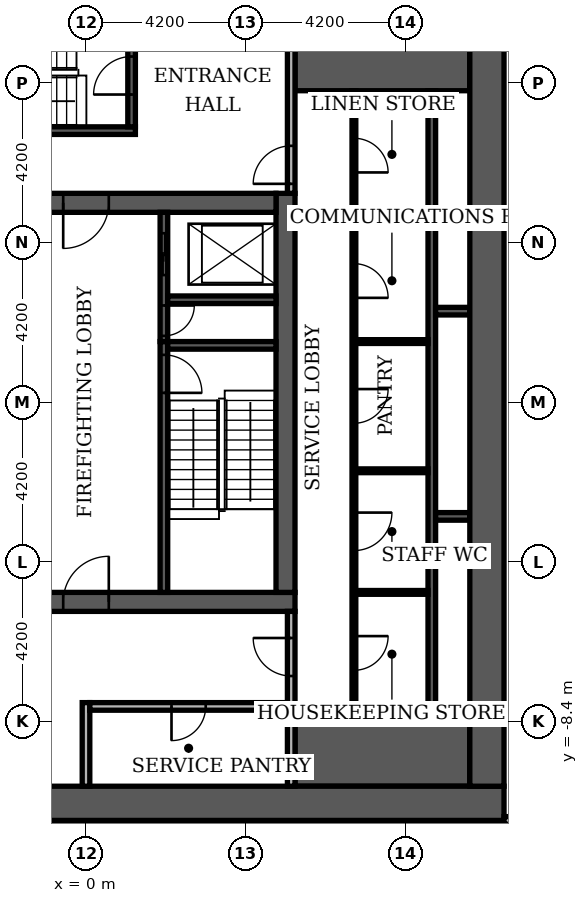
"""IFC4 building model, lengths in metres.
Left out: names, types, materials, properties, quantities, classifications, styles, units other than length and angle.
Written with IfcOpenShell. Run it as: python <this file> out.ifc"""

import sys

from ifc_helpers import new_model, si_unit, direction, frame, frame_2d, origin, place, context, subcontext, project, spatial, rectangle, extrude, element, fill, save


model = new_model("IFC4")
c1 = context("Model", 3, precision=1e-05, world=origin(), true_north=direction((0.0, 1.0)))
c2 = subcontext(c1, "Body", "Model", "MODEL_VIEW")
j1 = project(units=[si_unit("LENGTHUNIT", "METRE"), si_unit("PLANEANGLEUNIT", "RADIAN")], contexts=[c1])
p1 = place(None, origin())
s1 = spatial("IfcSite", under=j1, at=p1, CompositionType="ELEMENT")
p2 = place(p1, origin())
s2 = spatial("IfcBuilding", under=s1, at=p2, CompositionType="ELEMENT")
p3 = place(p2, frame((0.0, 0.0, -8.4)))
s3 = spatial("IfcBuildingStorey", under=s2, at=p3, CompositionType="ELEMENT", Elevation=-8.4)
p4 = place(p3, frame((-5.5, -5.25, 0.0), z_axis=(0.0, 0.0, 1.0), x_axis=(1.0, 0.0, 0.0)))
e1 = element("IfcWall", 1, at=p4, inside=s3, PredefinedType="SHEAR", context=c2, shape_type="SweptSolid", body=[
    extrude(rectangle(XDim=11.0, YDim=0.5, at=frame_2d((5.5, 0.0))), origin(), (0.0, 0.0, 1.0), 3.85),
])
p5 = place(p4, frame((4.9, 0.0, 0.0)))
e2 = element("IfcOpeningElement", 2, at=p5, cuts=e1, PredefinedType="OPENING", context=c2, shape_type="SweptSolid", body=[
    extrude(rectangle(XDim=1.2, YDim=2.1, at=frame_2d((0.6, 1.05))), frame((0.0, 0.26, 0.0), z_axis=(0.0, -1.0, 0.0), x_axis=(1.0, 0.0, 0.0)), (0.0, 0.0, 1.0), 0.52),
])
p6 = place(p3, frame((5.25, -5.0, 0.0), z_axis=(0.0, 0.0, 1.0), x_axis=(0.0, 1.0, 0.0)))
e3 = element("IfcWall", 3, at=p6, inside=s3, PredefinedType="SHEAR", context=c2, shape_type="SweptSolid", body=[
    extrude(rectangle(XDim=10.5, YDim=0.5, at=frame_2d((5.25, 0.0))), origin(), (0.0, 0.0, 1.0), 3.85),
])
p7 = place(p3, frame((-5.0, 5.25, 0.0), z_axis=(0.0, 0.0, 1.0), x_axis=(1.0, 0.0, 0.0)))
e4 = element("IfcWall", 4, at=p7, inside=s3, PredefinedType="SHEAR", context=c2, shape_type="SweptSolid", body=[
    extrude(rectangle(XDim=10.0, YDim=0.5, at=frame_2d((5.0, 0.0))), origin(), (0.0, 0.0, 1.0), 3.85),
])
p8 = place(p7, frame((4.4, 0.0, 0.0)))
e5 = element("IfcOpeningElement", 5, at=p8, cuts=e4, PredefinedType="OPENING", context=c2, shape_type="SweptSolid", body=[
    extrude(rectangle(XDim=1.2, YDim=2.1, at=frame_2d((0.6, 1.05))), frame((0.0, 0.26, 0.0), z_axis=(0.0, -1.0, 0.0), x_axis=(1.0, 0.0, 0.0)), (0.0, 0.0, 1.0), 0.52),
])
for number, where, z_axis, x_axis in (
    (6, (5.5, -9.15, 0.0), (0.0, 0.0, 1.0), (1.0, 0.0, 0.0)),
    (7, (5.5, 9.15, 0.0), (0.0, 0.0, 1.0), (1.0, 0.0, 0.0)),
):
    element("IfcWall", number, at=place(p3, frame(where, z_axis=z_axis, x_axis=x_axis)), inside=s3, PredefinedType="SHEAR", context=c2, shape_type="SweptSolid", body=[
        extrude(rectangle(XDim=4.6, YDim=1.9, at=frame_2d((2.3, 0.0))), origin(), (0.0, 0.0, 1.0), 3.85),
    ])
p9 = place(p3, frame((2.05, -5.0, 0.0), z_axis=(0.0, 0.0, 1.0), x_axis=(0.0, 1.0, 0.0)))
e8 = element("IfcWall", 8, at=p9, inside=s3, PredefinedType="SHEAR", context=c2, shape_type="SweptSolid", body=[
    extrude(rectangle(XDim=6.6, YDim=0.2, at=frame_2d((3.3, 0.0))), origin(), (0.0, 0.0, 1.0), 3.85),
])
p10 = place(p9, frame((5.25, 0.0, 0.0)))
e9 = element("IfcOpeningElement", 9, at=p10, cuts=e8, PredefinedType="OPENING", context=c2, shape_type="SweptSolid", body=[
    extrude(rectangle(XDim=1.0, YDim=2.1, at=frame_2d((0.5, 1.05))), frame((0.0, 0.11, 0.0), z_axis=(0.0, -1.0, 0.0), x_axis=(1.0, 0.0, 0.0)), (0.0, 0.0, 1.0), 0.22),
])
p11 = place(p3, frame((2.15, 1.5, 0.0), z_axis=(0.0, 0.0, 1.0), x_axis=(1.0, 0.0, 0.0)))
e10 = element("IfcWall", 10, at=p11, inside=s3, PredefinedType="SHEAR", context=c2, shape_type="SweptSolid", body=[
    extrude(rectangle(XDim=2.85, YDim=0.2, at=frame_2d((1.425, 0.0))), origin(), (0.0, 0.0, 1.0), 3.85),
])
p12 = place(p3, frame((-5.5, 7.15, 0.0), z_axis=(0.0, 0.0, 1.0), x_axis=(1.0, 0.0, 0.0)))
e11 = element("IfcWall", 11, at=p12, inside=s3, PredefinedType="SHEAR", context=c2, shape_type="SweptSolid", body=[
    extrude(rectangle(XDim=6.8, YDim=0.2, at=frame_2d((3.4, 0.0))), origin(), (0.0, 0.0, 1.0), 3.85),
])
p13 = place(p3, frame((1.2, 7.25, 0.0), z_axis=(0.0, 0.0, 1.0), x_axis=(0.0, 1.0, 0.0)))
e12 = element("IfcWall", 12, at=p13, inside=s3, PredefinedType="SHEAR", context=c2, shape_type="SweptSolid", body=[
    extrude(rectangle(XDim=2.85, YDim=0.2, at=frame_2d((1.425, 0.0))), origin(), (0.0, 0.0, 1.0), 3.85),
])
p14 = place(p13, frame((0.85, 0.0, 0.0)))
e13 = element("IfcOpeningElement", 13, at=p14, cuts=e12, PredefinedType="OPENING", context=c2, shape_type="SweptSolid", body=[
    extrude(rectangle(XDim=1.0, YDim=2.1, at=frame_2d((0.5, 1.05))), frame((0.0, 0.11, 0.0), z_axis=(0.0, -1.0, 0.0), x_axis=(1.0, 0.0, 0.0)), (0.0, 0.0, 1.0), 0.22),
])
p15 = place(p3, frame((9.1, -8.2, 0.0), z_axis=(0.0, 0.0, 1.0), x_axis=(0.0, 1.0, 0.0)))
e14 = element("IfcWall", 14, at=p15, inside=s3, PredefinedType="SHEAR", context=c2, shape_type="SweptSolid", body=[
    extrude(rectangle(XDim=16.4, YDim=0.2, at=frame_2d((8.2, 0.0))), origin(), (0.0, 0.0, 1.0), 3.85),
])
p16 = place(p3, frame((9.2, -3.0, 0.0), z_axis=(0.0, 0.0, 1.0), x_axis=(1.0, 0.0, 0.0)))
e15 = element("IfcWall", 15, at=p16, inside=s3, PredefinedType="SHEAR", context=c2, shape_type="SweptSolid", body=[
    extrude(rectangle(XDim=0.9, YDim=0.2, at=frame_2d((0.45, 0.0))), origin(), (0.0, 0.0, 1.0), 3.85),
])
p17 = place(p3, frame((2.05, 1.6, 0.0), z_axis=(0.0, 0.0, 1.0), x_axis=(0.0, 1.0, 0.0)))
e16 = element("IfcWall", 16, at=p17, inside=s3, PredefinedType="SHEAR", context=c2, shape_type="SweptSolid", body=[
    extrude(rectangle(XDim=3.4, YDim=0.2, at=frame_2d((1.7, 0.0))), origin(), (0.0, 0.0, 1.0), 3.85),
])
p18 = place(p17, frame((1.75, 0.0, 0.0)))
e17 = element("IfcOpeningElement", 17, at=p18, cuts=e16, PredefinedType="OPENING", context=c2, shape_type="SweptSolid", body=[
    extrude(rectangle(XDim=1.1, YDim=2.1, at=frame_2d((0.55, 1.05))), frame((0.0, 0.11, 0.0), z_axis=(0.0, -1.0, 0.0), x_axis=(1.0, 0.0, 0.0)), (0.0, 0.0, 1.0), 0.22),
])
p19 = place(p17, frame((0.15, 0.0, 0.0)))
e18 = element("IfcOpeningElement", 18, at=p19, cuts=e16, PredefinedType="OPENING", context=c2, shape_type="SweptSolid", body=[
    extrude(rectangle(XDim=0.8, YDim=2.1, at=frame_2d((0.4, 1.05))), frame((0.0, 0.11, 0.0), z_axis=(0.0, -1.0, 0.0), x_axis=(1.0, 0.0, 0.0)), (0.0, 0.0, 1.0), 0.22),
])
p20 = place(p3, frame((9.2, 2.4, 0.0), z_axis=(0.0, 0.0, 1.0), x_axis=(1.0, 0.0, 0.0)))
e19 = element("IfcWall", 19, at=p20, inside=s3, PredefinedType="SHEAR", context=c2, shape_type="SweptSolid", body=[
    extrude(rectangle(XDim=0.9, YDim=0.2, at=frame_2d((0.45, 0.0))), origin(), (0.0, 0.0, 1.0), 3.85),
])
p21 = place(p3, frame((2.15, 2.7, 0.0), z_axis=(0.0, 0.0, 1.0), x_axis=(1.0, 0.0, 0.0)))
e20 = element("IfcWall", 20, at=p21, inside=s3, PredefinedType="SHEAR", context=c2, shape_type="SweptSolid", body=[
    extrude(rectangle(XDim=2.85, YDim=0.2, at=frame_2d((1.425, 0.0))), origin(), (0.0, 0.0, 1.0), 3.85),
])
p22 = place(p3, frame((-11.0, -10.55, 0.0), z_axis=(0.0, 0.0, 1.0), x_axis=(1.0, 0.0, 0.0)))
e21 = element("IfcWall", 21, at=p22, inside=s3, PredefinedType="SHEAR", context=c2, shape_type="SweptSolid", body=[
    extrude(rectangle(XDim=22.0, YDim=0.9, at=frame_2d((11.0, 0.0))), origin(), (0.0, 0.0, 1.0), 3.85),
])
p23 = place(p22, frame((7.4, 0.0, 0.0)))
e22 = element("IfcOpeningElement", 22, at=p23, cuts=e21, PredefinedType="OPENING", context=c2, shape_type="SweptSolid", body=[
    extrude(rectangle(XDim=1.8, YDim=2.2, at=frame_2d((0.9, 1.1))), frame((0.0, 0.46, 0.0), z_axis=(0.0, -1.0, 0.0), x_axis=(1.0, 0.0, 0.0)), (0.0, 0.0, 1.0), 0.92),
])
p24 = place(p3, frame((10.55, -10.1, 0.0), z_axis=(0.0, 0.0, 1.0), x_axis=(0.0, 1.0, 0.0)))
e23 = element("IfcWall", 23, at=p24, inside=s3, PredefinedType="SHEAR", context=c2, shape_type="SweptSolid", body=[
    extrude(rectangle(XDim=20.2, YDim=0.9, at=frame_2d((10.1, 0.0))), origin(), (0.0, 0.0, 1.0), 3.85),
])
p25 = place(p3, frame((0.0, -10.1, 0.0), z_axis=(0.0, 0.0, 1.0), x_axis=(0.0, 1.0, 0.0)))
e24 = element("IfcWall", 24, at=p25, inside=s3, PredefinedType="PARTITIONING", context=c2, shape_type="SweptSolid", body=[
    extrude(rectangle(XDim=2.2, YDim=0.2, at=frame_2d((1.1, 0.0))), origin(), (0.0, 0.0, 1.0), 3.85),
])
p26 = place(p3, frame((5.4, -10.1, 0.0), z_axis=(0.0, 0.0, 1.0), x_axis=(0.0, 1.0, 0.0)))
e25 = element("IfcWall", 25, at=p26, inside=s3, PredefinedType="PARTITIONING", context=c2, shape_type="SweptSolid", body=[
    extrude(rectangle(XDim=4.6, YDim=0.2, at=frame_2d((2.3, 0.0))), origin(), (0.0, 0.0, 1.0), 3.85),
])
p27 = place(p26, frame((2.9, 0.0, 0.0)))
e26 = element("IfcOpeningElement", 26, at=p27, cuts=e25, PredefinedType="OPENING", context=c2, shape_type="SweptSolid", body=[
    extrude(rectangle(XDim=1.0, YDim=2.1, at=frame_2d((0.5, 1.05))), frame((0.0, 0.11, 0.0), z_axis=(0.0, -1.0, 0.0), x_axis=(1.0, 0.0, 0.0)), (0.0, 0.0, 1.0), 0.22),
])
p28 = place(p3, frame((7.05, -8.2, 0.0), z_axis=(0.0, 0.0, 1.0), x_axis=(0.0, 1.0, 0.0)))
e27 = element("IfcWall", 27, at=p28, inside=s3, PredefinedType="PARTITIONING", context=c2, shape_type="SweptSolid", body=[
    extrude(rectangle(XDim=16.4, YDim=0.1, at=frame_2d((8.2, 0.0))), origin(), (0.0, 0.0, 1.0), 3.85),
])
p29 = place(p28, frame((1.15, 0.0, 0.0)))
e28 = element("IfcOpeningElement", 28, at=p29, cuts=e27, PredefinedType="OPENING", context=c2, shape_type="SweptSolid", body=[
    extrude(rectangle(XDim=0.9, YDim=2.1, at=frame_2d((0.45, 1.05))), frame((0.0, 0.06, 0.0), z_axis=(0.0, -1.0, 0.0), x_axis=(1.0, 0.0, 0.0)), (0.0, 0.0, 1.0), 0.12),
])
p30 = place(p28, frame((4.3, 0.0, 0.0)))
e29 = element("IfcOpeningElement", 29, at=p30, cuts=e27, PredefinedType="OPENING", context=c2, shape_type="SweptSolid", body=[
    extrude(rectangle(XDim=1.0, YDim=2.1, at=frame_2d((0.5, 1.05))), frame((0.0, 0.06, 0.0), z_axis=(0.0, -1.0, 0.0), x_axis=(1.0, 0.0, 0.0)), (0.0, 0.0, 1.0), 0.12),
])
p31 = place(p28, frame((7.65, 0.0, 0.0)))
e30 = element("IfcOpeningElement", 30, at=p31, cuts=e27, PredefinedType="OPENING", context=c2, shape_type="SweptSolid", body=[
    extrude(rectangle(XDim=0.9, YDim=2.1, at=frame_2d((0.45, 1.05))), frame((0.0, 0.06, 0.0), z_axis=(0.0, -1.0, 0.0), x_axis=(1.0, 0.0, 0.0)), (0.0, 0.0, 1.0), 0.12),
])
p32 = place(p28, frame((10.95, 0.0, 0.0)))
e31 = element("IfcOpeningElement", 31, at=p32, cuts=e27, PredefinedType="OPENING", context=c2, shape_type="SweptSolid", body=[
    extrude(rectangle(XDim=0.9, YDim=2.1, at=frame_2d((0.45, 1.05))), frame((0.0, 0.06, 0.0), z_axis=(0.0, -1.0, 0.0), x_axis=(1.0, 0.0, 0.0)), (0.0, 0.0, 1.0), 0.12),
])
p33 = place(p28, frame((14.25, 0.0, 0.0)))
e32 = element("IfcOpeningElement", 32, at=p33, cuts=e27, PredefinedType="OPENING", context=c2, shape_type="SweptSolid", body=[
    extrude(rectangle(XDim=0.9, YDim=2.1, at=frame_2d((0.45, 1.05))), frame((0.0, 0.06, 0.0), z_axis=(0.0, -1.0, 0.0), x_axis=(1.0, 0.0, 0.0)), (0.0, 0.0, 1.0), 0.12),
])
p34 = place(p3, frame((0.1, -8.0, 0.0), z_axis=(0.0, 0.0, 1.0), x_axis=(1.0, 0.0, 0.0)))
e33 = element("IfcWall", 33, at=p34, inside=s3, PredefinedType="PARTITIONING", context=c2, shape_type="SweptSolid", body=[
    extrude(rectangle(XDim=5.2, YDim=0.2, at=frame_2d((2.6, 0.0))), origin(), (0.0, 0.0, 1.0), 3.85),
])
p35 = place(p34, frame((2.15, 0.0, 0.0)))
e34 = element("IfcOpeningElement", 34, at=p35, cuts=e33, PredefinedType="OPENING", context=c2, shape_type="SweptSolid", body=[
    extrude(rectangle(XDim=0.9, YDim=2.1, at=frame_2d((0.45, 1.05))), frame((0.0, 0.11, 0.0), z_axis=(0.0, -1.0, 0.0), x_axis=(1.0, 0.0, 0.0)), (0.0, 0.0, 1.0), 0.22),
])
for number, where, z_axis, x_axis in (
    (35, (7.1, -5.0, 0.0), (0.0, 0.0, 1.0), (1.0, 0.0, 0.0)),
    (36, (7.1, -1.8, 0.0), (0.0, 0.0, 1.0), (1.0, 0.0, 0.0)),
    (37, (7.1, 1.6, 0.0), (0.0, 0.0, 1.0), (1.0, 0.0, 0.0)),
    (38, (7.1, 4.8, 0.0), (0.0, 0.0, 1.0), (1.0, 0.0, 0.0)),
):
    element("IfcWall", number, at=place(p3, frame(where, z_axis=z_axis, x_axis=x_axis)), inside=s3, PredefinedType="PARTITIONING", context=c2, shape_type="SweptSolid", body=[
        extrude(rectangle(XDim=1.9, YDim=0.1, at=frame_2d((0.95, 0.0))), origin(), (0.0, 0.0, 1.0), 3.85),
    ])
p36 = place(p3, frame((5.4, 5.5, 0.0), z_axis=(0.0, 0.0, 1.0), x_axis=(0.0, 1.0, 0.0)))
e39 = element("IfcWall", 39, at=p36, inside=s3, PredefinedType="PARTITIONING", context=c2, shape_type="SweptSolid", body=[
    extrude(rectangle(XDim=4.6, YDim=0.2, at=frame_2d((2.3, 0.0))), origin(), (0.0, 0.0, 1.0), 3.85),
])
p37 = place(p36, frame((0.25, 0.0, 0.0)))
e40 = element("IfcOpeningElement", 40, at=p37, cuts=e39, PredefinedType="OPENING", context=c2, shape_type="SweptSolid", body=[
    extrude(rectangle(XDim=1.0, YDim=2.1, at=frame_2d((0.5, 1.05))), frame((0.0, 0.11, 0.0), z_axis=(0.0, -1.0, 0.0), x_axis=(1.0, 0.0, 0.0)), (0.0, 0.0, 1.0), 0.22),
])
p38 = place(p3, frame((11.0, -11.0, 0.0), z_axis=(0.0, 0.0, 1.0), x_axis=(1.0, 0.0, 0.0)))
e41 = element("IfcWall", 41, at=p38, inside=s3, PredefinedType="PARTITIONING", context=c2, shape_type="SweptSolid", body=[
    extrude(rectangle(XDim=14.3, YDim=0.2, at=frame_2d((7.15, 0.0))), origin(), (0.0, 0.0, 1.0), 3.85),
])
p39 = place(p38, frame((1.1, 0.0, 0.0)))
e42 = element("IfcOpeningElement", 42, at=p39, cuts=e41, PredefinedType="OPENING", context=c2, shape_type="SweptSolid", body=[
    extrude(rectangle(XDim=1.2, YDim=2.2, at=frame_2d((0.6, 1.1))), frame((0.0, 0.11, 0.0), z_axis=(0.0, -1.0, 0.0), x_axis=(1.0, 0.0, 0.0)), (0.0, 0.0, 1.0), 0.22),
])
p40 = place(p18, origin())
e43 = element("IfcDoor", 43, at=p40, inside=s3, OperationType="SLIDING_TO_LEFT", PredefinedType="DOOR", context=c2, shape_type="SweptSolid", body=[
    extrude(rectangle(XDim=1.1, YDim=2.1, at=frame_2d((0.55, 1.05))), frame((0.0, 0.025, 0.0), z_axis=(0.0, -1.0, 0.0), x_axis=(1.0, 0.0, 0.0)), (0.0, 0.0, 1.0), 0.05),
])
fill(e17, e43)
p41 = place(p10, frame((1.0, 0.0, 0.0), z_axis=(0.0, 0.0, 1.0), x_axis=(-1.0, 0.0, 0.0)))
e44 = element("IfcDoor", 44, at=p41, inside=s3, OperationType="SINGLE_SWING_LEFT", PredefinedType="DOOR", context=c2, shape_type="SweptSolid", body=[
    extrude(rectangle(XDim=1.0, YDim=2.1, at=frame_2d((0.5, 1.05))), frame((0.0, 0.025, 0.0), z_axis=(0.0, -1.0, 0.0), x_axis=(1.0, 0.0, 0.0)), (0.0, 0.0, 1.0), 0.05),
])
fill(e9, e44)
p42 = place(p19, frame((0.8, 0.0, 0.0), z_axis=(0.0, 0.0, 1.0), x_axis=(-1.0, 0.0, 0.0)))
e45 = element("IfcDoor", 45, at=p42, inside=s3, OperationType="SINGLE_SWING_RIGHT", PredefinedType="DOOR", context=c2, shape_type="SweptSolid", body=[
    extrude(rectangle(XDim=0.8, YDim=2.1, at=frame_2d((0.4, 1.05))), frame((0.0, 0.025, 0.0), z_axis=(0.0, -1.0, 0.0), x_axis=(1.0, 0.0, 0.0)), (0.0, 0.0, 1.0), 0.05),
])
fill(e18, e45)
p43 = place(p8, frame((1.2, 0.0, 0.0), z_axis=(0.0, 0.0, 1.0), x_axis=(-1.0, 0.0, 0.0)))
e46 = element("IfcDoor", 46, at=p43, inside=s3, OperationType="SINGLE_SWING_LEFT", PredefinedType="DOOR", context=c2, shape_type="SweptSolid", body=[
    extrude(rectangle(XDim=1.2, YDim=2.1, at=frame_2d((0.6, 1.05))), frame((0.0, 0.025, 0.0), z_axis=(0.0, -1.0, 0.0), x_axis=(1.0, 0.0, 0.0)), (0.0, 0.0, 1.0), 0.05),
])
fill(e5, e46)
p44 = place(p5, origin())
e47 = element("IfcDoor", 47, at=p44, inside=s3, OperationType="SINGLE_SWING_RIGHT", PredefinedType="DOOR", context=c2, shape_type="SweptSolid", body=[
    extrude(rectangle(XDim=1.2, YDim=2.1, at=frame_2d((0.6, 1.05))), frame((0.0, 0.025, 0.0), z_axis=(0.0, -1.0, 0.0), x_axis=(1.0, 0.0, 0.0)), (0.0, 0.0, 1.0), 0.05),
])
fill(e2, e47)
p45 = place(p14, origin())
e48 = element("IfcDoor", 48, at=p45, inside=s3, OperationType="SINGLE_SWING_LEFT", PredefinedType="DOOR", context=c2, shape_type="SweptSolid", body=[
    extrude(rectangle(XDim=1.0, YDim=2.1, at=frame_2d((0.5, 1.05))), frame((0.0, 0.025, 0.0), z_axis=(0.0, -1.0, 0.0), x_axis=(1.0, 0.0, 0.0)), (0.0, 0.0, 1.0), 0.05),
])
fill(e13, e48)
p46 = place(p37, origin())
e49 = element("IfcDoor", 49, at=p46, inside=s3, OperationType="SINGLE_SWING_LEFT", PredefinedType="DOOR", context=c2, shape_type="SweptSolid", body=[
    extrude(rectangle(XDim=1.0, YDim=2.1, at=frame_2d((0.5, 1.05))), frame((0.0, 0.025, 0.0), z_axis=(0.0, -1.0, 0.0), x_axis=(1.0, 0.0, 0.0)), (0.0, 0.0, 1.0), 0.05),
])
fill(e40, e49)
p47 = place(p27, origin())
e50 = element("IfcDoor", 50, at=p47, inside=s3, OperationType="SINGLE_SWING_RIGHT", PredefinedType="DOOR", context=c2, shape_type="SweptSolid", body=[
    extrude(rectangle(XDim=1.0, YDim=2.1, at=frame_2d((0.5, 1.05))), frame((0.0, 0.025, 0.0), z_axis=(0.0, -1.0, 0.0), x_axis=(1.0, 0.0, 0.0)), (0.0, 0.0, 1.0), 0.05),
])
fill(e26, e50)
p48 = place(p35, frame((0.9, 0.0, 0.0), z_axis=(0.0, 0.0, 1.0), x_axis=(-1.0, 0.0, 0.0)))
e51 = element("IfcDoor", 51, at=p48, inside=s3, OperationType="SINGLE_SWING_LEFT", PredefinedType="DOOR", context=c2, shape_type="SweptSolid", body=[
    extrude(rectangle(XDim=0.9, YDim=2.1, at=frame_2d((0.45, 1.05))), frame((0.0, 0.025, 0.0), z_axis=(0.0, -1.0, 0.0), x_axis=(1.0, 0.0, 0.0)), (0.0, 0.0, 1.0), 0.05),
])
fill(e34, e51)
p49 = place(p29, frame((0.9, 0.0, 0.0), z_axis=(0.0, 0.0, 1.0), x_axis=(-1.0, 0.0, 0.0)))
e52 = element("IfcDoor", 52, at=p49, inside=s3, OperationType="SINGLE_SWING_RIGHT", PredefinedType="DOOR", context=c2, shape_type="SweptSolid", body=[
    extrude(rectangle(XDim=0.9, YDim=2.1, at=frame_2d((0.45, 1.05))), frame((0.0, 0.025, 0.0), z_axis=(0.0, -1.0, 0.0), x_axis=(1.0, 0.0, 0.0)), (0.0, 0.0, 1.0), 0.05),
])
fill(e28, e52)
p50 = place(p30, frame((1.0, 0.0, 0.0), z_axis=(0.0, 0.0, 1.0), x_axis=(-1.0, 0.0, 0.0)))
e53 = element("IfcDoor", 53, at=p50, inside=s3, OperationType="SINGLE_SWING_RIGHT", PredefinedType="DOOR", context=c2, shape_type="SweptSolid", body=[
    extrude(rectangle(XDim=1.0, YDim=2.1, at=frame_2d((0.5, 1.05))), frame((0.0, 0.025, 0.0), z_axis=(0.0, -1.0, 0.0), x_axis=(1.0, 0.0, 0.0)), (0.0, 0.0, 1.0), 0.05),
])
fill(e29, e53)
p51 = place(p31, frame((0.9, 0.0, 0.0), z_axis=(0.0, 0.0, 1.0), x_axis=(-1.0, 0.0, 0.0)))
e54 = element("IfcDoor", 54, at=p51, inside=s3, OperationType="SINGLE_SWING_RIGHT", PredefinedType="DOOR", context=c2, shape_type="SweptSolid", body=[
    extrude(rectangle(XDim=0.9, YDim=2.1, at=frame_2d((0.45, 1.05))), frame((0.0, 0.025, 0.0), z_axis=(0.0, -1.0, 0.0), x_axis=(1.0, 0.0, 0.0)), (0.0, 0.0, 1.0), 0.05),
])
fill(e30, e54)
p52 = place(p32, frame((0.9, 0.0, 0.0), z_axis=(0.0, 0.0, 1.0), x_axis=(-1.0, 0.0, 0.0)))
e55 = element("IfcDoor", 55, at=p52, inside=s3, OperationType="SINGLE_SWING_LEFT", PredefinedType="DOOR", context=c2, shape_type="SweptSolid", body=[
    extrude(rectangle(XDim=0.9, YDim=2.1, at=frame_2d((0.45, 1.05))), frame((0.0, 0.025, 0.0), z_axis=(0.0, -1.0, 0.0), x_axis=(1.0, 0.0, 0.0)), (0.0, 0.0, 1.0), 0.05),
])
fill(e31, e55)
p53 = place(p33, frame((0.9, 0.0, 0.0), z_axis=(0.0, 0.0, 1.0), x_axis=(-1.0, 0.0, 0.0)))
e56 = element("IfcDoor", 56, at=p53, inside=s3, OperationType="SINGLE_SWING_LEFT", PredefinedType="DOOR", context=c2, shape_type="SweptSolid", body=[
    extrude(rectangle(XDim=0.9, YDim=2.1, at=frame_2d((0.45, 1.05))), frame((0.0, 0.025, 0.0), z_axis=(0.0, -1.0, 0.0), x_axis=(1.0, 0.0, 0.0)), (0.0, 0.0, 1.0), 0.05),
])
fill(e32, e56)
save(model, sys.argv[1])
